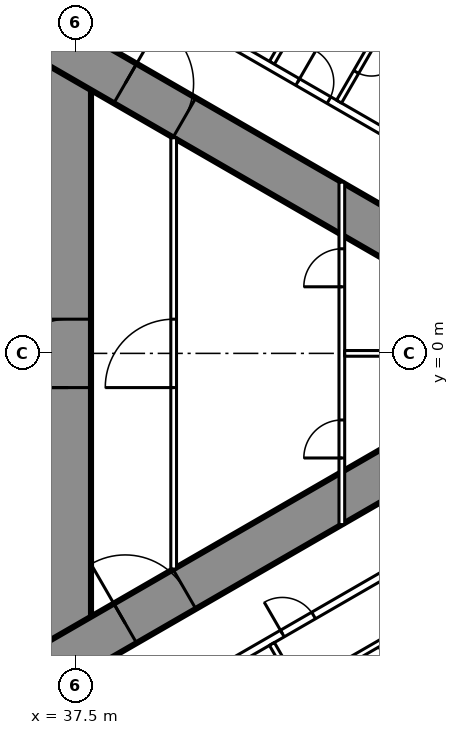
"""IFC4 building model, lengths in metres.
Left out: names, types, materials, properties, quantities, classifications, styles, units other than length and angle.
Written with IfcOpenShell. Run it as: python <this file> out.ifc"""

import sys

from ifc_helpers import new_model, si_unit, direction, frame, frame_2d, origin, place, context, subcontext, project, spatial, rectangle, extrude, element, fill, save


model = new_model("IFC4")
c1 = context("Model", 3, precision=1e-05, world=origin(), true_north=direction((0.0, 1.0)))
c2 = subcontext(c1, "Body", "Model", "MODEL_VIEW")
j1 = project(units=[si_unit("LENGTHUNIT", "METRE"), si_unit("PLANEANGLEUNIT", "RADIAN")], contexts=[c1])
p1 = place(None, origin())
s1 = spatial("IfcSite", under=j1, at=p1, CompositionType="ELEMENT")
p2 = place(p1, origin())
s2 = spatial("IfcBuilding", under=s1, at=p2, CompositionType="ELEMENT")
p3 = place(p2, frame((0.0, 0.0, 222.5)))
s3 = spatial("IfcBuildingStorey", under=s2, at=p3, CompositionType="ELEMENT", Elevation=222.5)
p4 = place(p3, frame((37.3, -8.6, 0.0), z_axis=(0.0, 0.0, 1.0), x_axis=(0.0, 1.0, 0.0)))
e1 = element("IfcWall", 1, at=p4, inside=s3, PredefinedType="SHEAR", context=c2, shape_type="SweptSolid", body=[
    extrude(rectangle(XDim=17.2, YDim=1.2, at=frame_2d((8.6, 0.0))), origin(), (0.0, 0.0, 1.0), 3.6),
])
p5 = place(p4, frame((7.7, 0.0, 0.0)))
e2 = element("IfcOpeningElement", 2, at=p5, cuts=e1, PredefinedType="OPENING", context=c2, shape_type="SweptSolid", body=[
    extrude(rectangle(XDim=1.8, YDim=2.2, at=frame_2d((0.9, 1.1))), frame((0.0, 0.61, 0.0), z_axis=(0.0, -1.0, 0.0), x_axis=(1.0, 0.0, 0.0)), (0.0, 0.0, 1.0), 1.22),
])
p6 = place(p3, frame((27.2, -13.8, 0.0), z_axis=(0.0, 0.0, 1.0), x_axis=(0.866027159892, 0.499996958321, 0.0)))
e3 = element("IfcWall", 3, at=p6, inside=s3, PredefinedType="SHEAR", context=c2, shape_type="SweptSolid", body=[
    extrude(rectangle(XDim=27.947, YDim=1.2, at=frame_2d((13.973, 0.0))), origin(), (0.0, 0.0, 1.0), 3.6),
])
p7 = place(p6, frame((4.6, 0.0, 0.0)))
e4 = element("IfcOpeningElement", 4, at=p7, cuts=e3, PredefinedType="OPENING", context=c2, shape_type="SweptSolid", body=[
    extrude(rectangle(XDim=1.0, YDim=2.2, at=frame_2d((0.5, 1.1))), frame((0.0, 0.61, 0.0), z_axis=(0.0, -1.0, 0.0), x_axis=(1.0, 0.0, 0.0)), (0.0, 0.0, 1.0), 1.22),
])
p8 = place(p6, frame((13.395, 0.0, 0.0)))
e5 = element("IfcOpeningElement", 5, at=p8, cuts=e3, PredefinedType="OPENING", context=c2, shape_type="SweptSolid", body=[
    extrude(rectangle(XDim=1.8, YDim=2.2, at=frame_2d((0.9, 1.1))), frame((0.0, 0.61, 0.0), z_axis=(0.0, -1.0, 0.0), x_axis=(1.0, 0.0, 0.0)), (0.0, 0.0, 1.0), 1.22),
])
p9 = place(p3, frame((27.2, 13.8, 0.0), z_axis=(0.0, 0.0, 1.0), x_axis=(0.866024515034, -0.500001539357, 0.0)))
e6 = element("IfcWall", 6, at=p9, inside=s3, PredefinedType="SHEAR", context=c2, shape_type="SweptSolid", body=[
    extrude(rectangle(XDim=26.907, YDim=1.2, at=frame_2d((13.454, 0.0))), origin(), (0.0, 0.0, 1.0), 3.6),
])
p10 = place(p9, frame((4.6, 0.0, 0.0)))
e7 = element("IfcOpeningElement", 7, at=p10, cuts=e6, PredefinedType="OPENING", context=c2, shape_type="SweptSolid", body=[
    extrude(rectangle(XDim=1.0, YDim=2.2, at=frame_2d((0.5, 1.1))), frame((0.0, 0.61, 0.0), z_axis=(0.0, -1.0, 0.0), x_axis=(1.0, 0.0, 0.0)), (0.0, 0.0, 1.0), 1.22),
])
p11 = place(p9, frame((13.395, 0.0, 0.0)))
e8 = element("IfcOpeningElement", 8, at=p11, cuts=e6, PredefinedType="OPENING", context=c2, shape_type="SweptSolid", body=[
    extrude(rectangle(XDim=1.8, YDim=2.2, at=frame_2d((0.9, 1.1))), frame((0.0, 0.61, 0.0), z_axis=(0.0, -1.0, 0.0), x_axis=(1.0, 0.0, 0.0)), (0.0, 0.0, 1.0), 1.22),
])
p12 = place(p3, frame((28.959, -15.44, 0.0), z_axis=(0.0, 0.0, 1.0), x_axis=(0.866025227435, 0.500000305447, 0.0)))
e9 = element("IfcWall", 9, at=p12, inside=s3, PredefinedType="PARTITIONING", context=c2, shape_type="SweptSolid", body=[
    extrude(rectangle(XDim=30.88, YDim=0.2, at=frame_2d((15.44, 0.0))), origin(), (0.0, 0.0, 1.0), 3.35),
])
p13 = place(p12, frame((1.494, 0.0, 0.0)))
e10 = element("IfcOpeningElement", 10, at=p13, cuts=e9, PredefinedType="OPENING", context=c2, shape_type="SweptSolid", body=[
    extrude(rectangle(XDim=1.8, YDim=2.03, at=frame_2d((0.9, 1.015))), frame((0.0, 0.11, 0.0), z_axis=(0.0, -1.0, 0.0), x_axis=(1.0, 0.0, 0.0)), (0.0, 0.0, 1.0), 0.22),
])
p14 = place(p12, frame((7.687, 0.0, 0.0)))
e11 = element("IfcOpeningElement", 11, at=p14, cuts=e9, PredefinedType="OPENING", context=c2, shape_type="SweptSolid", body=[
    extrude(rectangle(XDim=1.0, YDim=2.2, at=frame_2d((0.5, 1.1))), frame((0.0, 0.11, 0.0), z_axis=(0.0, -1.0, 0.0), x_axis=(1.0, 0.0, 0.0)), (0.0, 0.0, 1.0), 0.22),
])
p15 = place(p12, frame((16.137, 0.0, 0.0)))
e12 = element("IfcOpeningElement", 12, at=p15, cuts=e9, PredefinedType="OPENING", context=c2, shape_type="SweptSolid", body=[
    extrude(rectangle(XDim=0.95, YDim=2.2, at=frame_2d((0.475, 1.1))), frame((0.0, 0.11, 0.0), z_axis=(0.0, -1.0, 0.0), x_axis=(1.0, 0.0, 0.0)), (0.0, 0.0, 1.0), 0.22),
])
p16 = place(p12, frame((20.021, 0.0, 0.0)))
e13 = element("IfcOpeningElement", 13, at=p16, cuts=e9, PredefinedType="OPENING", context=c2, shape_type="SweptSolid", body=[
    extrude(rectangle(XDim=0.95, YDim=2.2, at=frame_2d((0.475, 1.1))), frame((0.0, 0.11, 0.0), z_axis=(0.0, -1.0, 0.0), x_axis=(1.0, 0.0, 0.0)), (0.0, 0.0, 1.0), 0.22),
])
p17 = place(p12, frame((26.253, 0.0, 0.0)))
e14 = element("IfcOpeningElement", 14, at=p17, cuts=e9, PredefinedType="OPENING", context=c2, shape_type="SweptSolid", body=[
    extrude(rectangle(XDim=0.95, YDim=2.2, at=frame_2d((0.475, 1.1))), frame((0.0, 0.11, 0.0), z_axis=(0.0, -1.0, 0.0), x_axis=(1.0, 0.0, 0.0)), (0.0, 0.0, 1.0), 0.22),
])
for number, where, z_axis, x_axis in (
    (15, (42.66, -7.646, 0.0), (0.0, 0.0, 1.0), (0.5, -0.866, 0.0)),
    (16, (42.66, 7.646, 0.0), (0.0, 0.0, 1.0), (0.5, 0.866, 0.0)),
):
    element("IfcWall", number, at=place(p3, frame(where, z_axis=z_axis, x_axis=x_axis)), inside=s3, PredefinedType="PARTITIONING", context=c2, shape_type="SweptSolid", body=[
        extrude(rectangle(XDim=6.398, YDim=0.15, at=frame_2d((3.199, 0.0))), origin(), (0.0, 0.0, 1.0), 2.45),
    ])
p18 = place(p3, frame((28.959, 15.44, 0.0), z_axis=(0.0, 0.0, 1.0), x_axis=(0.866028936079, -0.499993881836, 0.0)))
e17 = element("IfcWall", 17, at=p18, inside=s3, PredefinedType="PARTITIONING", context=c2, shape_type="SweptSolid", body=[
    extrude(rectangle(XDim=20.503, YDim=0.2, at=frame_2d((10.251, 0.0))), origin(), (0.0, 0.0, 1.0), 3.35),
])
p19 = place(p18, frame((16.603, 0.0, 0.0)))
e18 = element("IfcOpeningElement", 18, at=p19, cuts=e17, PredefinedType="OPENING", context=c2, shape_type="SweptSolid", body=[
    extrude(rectangle(XDim=0.95, YDim=2.2, at=frame_2d((0.475, 1.1))), frame((0.0, 0.11, 0.0), z_axis=(0.0, -1.0, 0.0), x_axis=(1.0, 0.0, 0.0)), (0.0, 0.0, 1.0), 0.22),
])
p20 = place(p18, frame((7.287, 0.0, 0.0)))
e19 = element("IfcOpeningElement", 19, at=p20, cuts=e17, PredefinedType="OPENING", context=c2, shape_type="SweptSolid", body=[
    extrude(rectangle(XDim=0.95, YDim=2.2, at=frame_2d((0.475, 1.1))), frame((0.0, 0.11, 0.0), z_axis=(0.0, -1.0, 0.0), x_axis=(1.0, 0.0, 0.0)), (0.0, 0.0, 1.0), 0.22),
])
p21 = place(p18, frame((2.244, 0.0, 0.0)))
e20 = element("IfcOpeningElement", 20, at=p21, cuts=e17, PredefinedType="OPENING", context=c2, shape_type="SweptSolid", body=[
    extrude(rectangle(XDim=1.8, YDim=2.03, at=frame_2d((0.9, 1.015))), frame((0.0, 0.11, 0.0), z_axis=(0.0, -1.0, 0.0), x_axis=(1.0, 0.0, 0.0)), (0.0, 0.0, 1.0), 0.22),
])
p22 = place(p3, frame((45.503, -7.621, 0.0), z_axis=(0.0, 0.0, 1.0), x_axis=(0.500006934395, -0.866021400173, 0.0)))
e21 = element("IfcWall", 21, at=p22, inside=s3, PredefinedType="PARTITIONING", context=c2, shape_type="SweptSolid", body=[
    extrude(rectangle(XDim=2.6, YDim=0.15, at=frame_2d((1.3, 0.0))), origin(), (0.0, 0.0, 1.0), 3.35),
])
p23 = place(p22, frame((0.9, 0.0, 0.0)))
e22 = element("IfcOpeningElement", 22, at=p23, cuts=e21, PredefinedType="OPENING", context=c2, shape_type="SweptSolid", body=[
    extrude(rectangle(XDim=0.8, YDim=2.2, at=frame_2d((0.4, 1.1))), frame((0.0, 0.085, 0.0), z_axis=(0.0, -1.0, 0.0), x_axis=(1.0, 0.0, 0.0)), (0.0, 0.0, 1.0), 0.17),
])
p24 = place(p3, frame((43.425, -8.821, 0.0), z_axis=(0.0, 0.0, 1.0), x_axis=(0.866006523861, 0.500032699561, 0.0)))
e23 = element("IfcWall", 23, at=p24, inside=s3, PredefinedType="PARTITIONING", context=c2, shape_type="SweptSolid", body=[
    extrude(rectangle(XDim=2.475, YDim=0.15, at=frame_2d((1.237, 0.0))), origin(), (0.0, 0.0, 1.0), 3.35),
])
p25 = place(p3, frame((44.427, 6.625, 0.0), z_axis=(0.0, 0.0, 1.0), x_axis=(0.500006934395, 0.866021400173, 0.0)))
e24 = element("IfcWall", 24, at=p25, inside=s3, PredefinedType="PARTITIONING", context=c2, shape_type="SweptSolid", body=[
    extrude(rectangle(XDim=2.6, YDim=0.15, at=frame_2d((1.3, 0.0))), origin(), (0.0, 0.0, 1.0), 3.35),
])
p26 = place(p25, frame((0.9, 0.0, 0.0)))
e25 = element("IfcOpeningElement", 25, at=p26, cuts=e24, PredefinedType="OPENING", context=c2, shape_type="SweptSolid", body=[
    extrude(rectangle(XDim=0.8, YDim=2.2, at=frame_2d((0.4, 1.1))), frame((0.0, 0.085, 0.0), z_axis=(0.0, -1.0, 0.0), x_axis=(1.0, 0.0, 0.0)), (0.0, 0.0, 1.0), 0.17),
])
p27 = place(p3, frame((40.075, -5.674, 0.0), z_axis=(0.0, 0.0, 1.0), x_axis=(0.0, 1.0, 0.0)))
e26 = element("IfcWall", 26, at=p27, inside=s3, PredefinedType="PARTITIONING", context=c2, shape_type="SweptSolid", body=[
    extrude(rectangle(XDim=11.348, YDim=0.15, at=frame_2d((5.674, 0.0))), origin(), (0.0, 0.0, 1.0), 3.35),
])
p28 = place(p27, frame((4.774, 0.0, 0.0)))
e27 = element("IfcOpeningElement", 27, at=p28, cuts=e26, PredefinedType="OPENING", context=c2, shape_type="SweptSolid", body=[
    extrude(rectangle(XDim=1.8, YDim=2.2, at=frame_2d((0.9, 1.1))), frame((0.0, 0.085, 0.0), z_axis=(0.0, -1.0, 0.0), x_axis=(1.0, 0.0, 0.0)), (0.0, 0.0, 1.0), 0.17),
])
p29 = place(p3, frame((44.5, -4.505, 0.0), z_axis=(0.0, 0.0, 1.0), x_axis=(0.0, 1.0, 0.0)))
e28 = element("IfcWall", 28, at=p29, inside=s3, PredefinedType="PARTITIONING", context=c2, shape_type="SweptSolid", body=[
    extrude(rectangle(XDim=9.009, YDim=0.15, at=frame_2d((4.505, 0.0))), origin(), (0.0, 0.0, 1.0), 3.35),
])
p30 = place(p29, frame((1.752, 0.0, 0.0)))
e29 = element("IfcOpeningElement", 29, at=p30, cuts=e28, PredefinedType="OPENING", context=c2, shape_type="SweptSolid", body=[
    extrude(rectangle(XDim=1.0, YDim=2.2, at=frame_2d((0.5, 1.1))), frame((0.0, 0.085, 0.0), z_axis=(0.0, -1.0, 0.0), x_axis=(1.0, 0.0, 0.0)), (0.0, 0.0, 1.0), 0.17),
])
p31 = place(p29, frame((6.257, 0.0, 0.0)))
e30 = element("IfcOpeningElement", 30, at=p31, cuts=e28, PredefinedType="OPENING", context=c2, shape_type="SweptSolid", body=[
    extrude(rectangle(XDim=1.0, YDim=2.2, at=frame_2d((0.5, 1.1))), frame((0.0, 0.085, 0.0), z_axis=(0.0, -1.0, 0.0), x_axis=(1.0, 0.0, 0.0)), (0.0, 0.0, 1.0), 0.17),
])
p32 = place(p3, frame((44.575, 0.0, 0.0), z_axis=(0.0, 0.0, 1.0), x_axis=(1.0, 0.0, 0.0)))
e31 = element("IfcWall", 31, at=p32, inside=s3, PredefinedType="PARTITIONING", context=c2, shape_type="SweptSolid", body=[
    extrude(rectangle(XDim=7.727, YDim=0.15, at=frame_2d((3.864, 0.0))), origin(), (0.0, 0.0, 1.0), 2.45),
])
p33 = place(p15, origin())
e32 = element("IfcDoor", 32, at=p33, inside=s3, OperationType="SINGLE_SWING_LEFT", PredefinedType="DOOR", context=c2, shape_type="SweptSolid", body=[
    extrude(rectangle(XDim=0.95, YDim=2.2, at=frame_2d((0.475, 1.1))), frame((0.0, 0.025, 0.0), z_axis=(0.0, -1.0, 0.0), x_axis=(1.0, 0.0, 0.0)), (0.0, 0.0, 1.0), 0.05),
])
fill(e12, e32)
p34 = place(p26, origin())
e33 = element("IfcDoor", 33, at=p34, inside=s3, OperationType="SINGLE_SWING_RIGHT", PredefinedType="DOOR", context=c2, shape_type="SweptSolid", body=[
    extrude(rectangle(XDim=0.8, YDim=2.2, at=frame_2d((0.4, 1.1))), frame((0.0, 0.025, 0.0), z_axis=(0.0, -1.0, 0.0), x_axis=(1.0, 0.0, 0.0)), (0.0, 0.0, 1.0), 0.05),
])
fill(e25, e33)
p35 = place(p19, origin())
e34 = element("IfcDoor", 34, at=p35, inside=s3, OperationType="SINGLE_SWING_LEFT", PredefinedType="DOOR", context=c2, shape_type="SweptSolid", body=[
    extrude(rectangle(XDim=0.95, YDim=2.2, at=frame_2d((0.475, 1.1))), frame((0.0, 0.025, 0.0), z_axis=(0.0, -1.0, 0.0), x_axis=(1.0, 0.0, 0.0)), (0.0, 0.0, 1.0), 0.05),
])
fill(e18, e34)
p36 = place(p28, origin())
e35 = element("IfcDoor", 35, at=p36, inside=s3, OperationType="DOUBLE_DOOR_SINGLE_SWING", PredefinedType="DOOR", context=c2, shape_type="SweptSolid", body=[
    extrude(rectangle(XDim=1.8, YDim=2.2, at=frame_2d((0.9, 1.1))), frame((0.0, 0.025, 0.0), z_axis=(0.0, -1.0, 0.0), x_axis=(1.0, 0.0, 0.0)), (0.0, 0.0, 1.0), 0.05),
])
fill(e27, e35)
p37 = place(p30, origin())
e36 = element("IfcDoor", 36, at=p37, inside=s3, OperationType="SINGLE_SWING_LEFT", PredefinedType="DOOR", context=c2, shape_type="SweptSolid", body=[
    extrude(rectangle(XDim=1.0, YDim=2.2, at=frame_2d((0.5, 1.1))), frame((0.0, 0.025, 0.0), z_axis=(0.0, -1.0, 0.0), x_axis=(1.0, 0.0, 0.0)), (0.0, 0.0, 1.0), 0.05),
])
fill(e29, e36)
p38 = place(p31, origin())
e37 = element("IfcDoor", 37, at=p38, inside=s3, OperationType="SINGLE_SWING_LEFT", PredefinedType="DOOR", context=c2, shape_type="SweptSolid", body=[
    extrude(rectangle(XDim=1.0, YDim=2.2, at=frame_2d((0.5, 1.1))), frame((0.0, 0.025, 0.0), z_axis=(0.0, -1.0, 0.0), x_axis=(1.0, 0.0, 0.0)), (0.0, 0.0, 1.0), 0.05),
])
fill(e30, e37)
p39 = place(p8, origin())
e38 = element("IfcDoor", 38, at=p39, inside=s3, OperationType="DOUBLE_DOOR_SINGLE_SWING", PredefinedType="DOOR", context=c2, shape_type="SweptSolid", body=[
    extrude(rectangle(XDim=1.8, YDim=2.2, at=frame_2d((0.9, 1.1))), frame((0.0, 0.025, 0.0), z_axis=(0.0, -1.0, 0.0), x_axis=(1.0, 0.0, 0.0)), (0.0, 0.0, 1.0), 0.05),
])
fill(e5, e38)
p40 = place(p11, origin())
e39 = element("IfcDoor", 39, at=p40, inside=s3, OperationType="DOUBLE_DOOR_SINGLE_SWING", PredefinedType="DOOR", context=c2, shape_type="SweptSolid", body=[
    extrude(rectangle(XDim=1.8, YDim=2.2, at=frame_2d((0.9, 1.1))), frame((0.0, 0.025, 0.0), z_axis=(0.0, -1.0, 0.0), x_axis=(1.0, 0.0, 0.0)), (0.0, 0.0, 1.0), 0.05),
])
fill(e8, e39)
p41 = place(p5, origin())
e40 = element("IfcDoor", 40, at=p41, inside=s3, OperationType="DOUBLE_DOOR_SINGLE_SWING", PredefinedType="DOOR", context=c2, shape_type="SweptSolid", body=[
    extrude(rectangle(XDim=1.8, YDim=2.2, at=frame_2d((0.9, 1.1))), frame((0.0, 0.025, 0.0), z_axis=(0.0, -1.0, 0.0), x_axis=(1.0, 0.0, 0.0)), (0.0, 0.0, 1.0), 0.05),
])
fill(e2, e40)
save(model, sys.argv[1])
